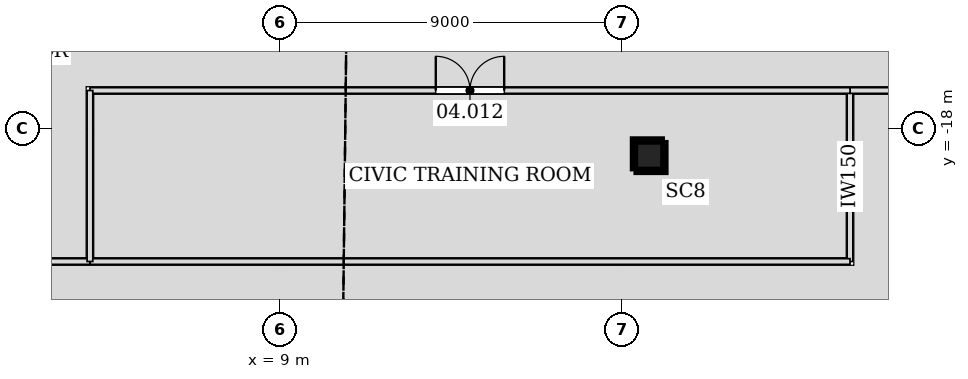
"""IFC4 building model, lengths in metres.
Left out: names, types, materials, properties, quantities, classifications, styles, units other than length and angle.
Written with IfcOpenShell. Run it as: python <this file> out.ifc"""

import sys

from ifc_helpers import new_model, si_unit, direction, frame, frame_2d, origin, origin_2d, place, context, subcontext, project, spatial, rectangle, hollow_rectangle, extrude, element, fill, save


model = new_model("IFC4")
c1 = context("Model", 3, precision=1e-05, world=origin(), true_north=direction((0.0, 1.0)))
c2 = subcontext(c1, "Body", "Model", "MODEL_VIEW")
j1 = project(units=[si_unit("LENGTHUNIT", "METRE"), si_unit("PLANEANGLEUNIT", "RADIAN")], contexts=[c1])
p1 = place(None, origin())
s1 = spatial("IfcSite", under=j1, at=p1, CompositionType="ELEMENT")
p2 = place(p1, origin())
s2 = spatial("IfcBuilding", under=s1, at=p2, CompositionType="ELEMENT")
p3 = place(p2, frame((0.0, 0.0, 24.0)))
s3 = spatial("IfcBuildingStorey", under=s2, at=p3, CompositionType="ELEMENT", Elevation=24.0)
p4 = place(p3, frame((18.764, -18.764, 0.0), z_axis=(-0.019980828539, 0.019980828539, 0.999600686765), x_axis=(-0.707106781187, -0.707106781187, 0.0)))
e1 = element("IfcColumn", 1, at=p4, inside=s3, PredefinedType="COLUMN", context=c2, shape_type="SweptSolid", body=[
    extrude(hollow_rectangle(XDim=0.8, YDim=0.8, WallThickness=0.05, at=origin_2d()), origin(), (0.0, 0.0, 1.0), 4.802),
])
p5 = place(p3, frame((14.788, -35.876, 0.0), z_axis=(0.0, 0.0, 1.0), x_axis=(0.707106781187, 0.707106781187, 0.0)))
e2 = element("IfcWall", 2, at=p5, inside=s3, PredefinedType="SOLIDWALL", context=c2, shape_type="SweptSolid", body=[
    extrude(rectangle(XDim=29.823, YDim=0.35, at=frame_2d((14.912, 0.0))), origin(), (0.0, 0.0, 1.0), 4.5),
])
p6 = place(p5, frame((0.822, 0.0, 0.9)))
e3 = element("IfcOpeningElement", 3, at=p6, cuts=e2, PredefinedType="OPENING", context=c2, shape_type="SweptSolid", body=[
    extrude(rectangle(XDim=1.2, YDim=3.0, at=frame_2d((0.6, 1.5))), frame((0.0, 0.185, 0.0), z_axis=(0.0, -1.0, 0.0), x_axis=(1.0, 0.0, 0.0)), (0.0, 0.0, 1.0), 0.37),
])
p7 = place(p5, frame((3.52, 0.0, 0.9)))
e4 = element("IfcOpeningElement", 4, at=p7, cuts=e2, PredefinedType="OPENING", context=c2, shape_type="SweptSolid", body=[
    extrude(rectangle(XDim=1.2, YDim=3.0, at=frame_2d((0.6, 1.5))), frame((0.0, 0.185, 0.0), z_axis=(0.0, -1.0, 0.0), x_axis=(1.0, 0.0, 0.0)), (0.0, 0.0, 1.0), 0.37),
])
p8 = place(p5, frame((6.218, 0.0, 0.9)))
e5 = element("IfcOpeningElement", 5, at=p8, cuts=e2, PredefinedType="OPENING", context=c2, shape_type="SweptSolid", body=[
    extrude(rectangle(XDim=1.2, YDim=3.0, at=frame_2d((0.6, 1.5))), frame((0.0, 0.185, 0.0), z_axis=(0.0, -1.0, 0.0), x_axis=(1.0, 0.0, 0.0)), (0.0, 0.0, 1.0), 0.37),
])
p9 = place(p5, frame((8.916, 0.0, 0.9)))
e6 = element("IfcOpeningElement", 6, at=p9, cuts=e2, PredefinedType="OPENING", context=c2, shape_type="SweptSolid", body=[
    extrude(rectangle(XDim=1.2, YDim=3.0, at=frame_2d((0.6, 1.5))), frame((0.0, 0.185, 0.0), z_axis=(0.0, -1.0, 0.0), x_axis=(1.0, 0.0, 0.0)), (0.0, 0.0, 1.0), 0.37),
])
p10 = place(p5, frame((11.614, 0.0, 0.9)))
e7 = element("IfcOpeningElement", 7, at=p10, cuts=e2, PredefinedType="OPENING", context=c2, shape_type="SweptSolid", body=[
    extrude(rectangle(XDim=1.2, YDim=3.0, at=frame_2d((0.6, 1.5))), frame((0.0, 0.185, 0.0), z_axis=(0.0, -1.0, 0.0), x_axis=(1.0, 0.0, 0.0)), (0.0, 0.0, 1.0), 0.37),
])
p11 = place(p5, frame((14.312, 0.0, 0.9)))
e8 = element("IfcOpeningElement", 8, at=p11, cuts=e2, PredefinedType="OPENING", context=c2, shape_type="SweptSolid", body=[
    extrude(rectangle(XDim=1.2, YDim=3.0, at=frame_2d((0.6, 1.5))), frame((0.0, 0.185, 0.0), z_axis=(0.0, -1.0, 0.0), x_axis=(1.0, 0.0, 0.0)), (0.0, 0.0, 1.0), 0.37),
])
p12 = place(p5, frame((17.01, 0.0, 0.9)))
e9 = element("IfcOpeningElement", 9, at=p12, cuts=e2, PredefinedType="OPENING", context=c2, shape_type="SweptSolid", body=[
    extrude(rectangle(XDim=1.2, YDim=3.0, at=frame_2d((0.6, 1.5))), frame((0.0, 0.185, 0.0), z_axis=(0.0, -1.0, 0.0), x_axis=(1.0, 0.0, 0.0)), (0.0, 0.0, 1.0), 0.37),
])
p13 = place(p5, frame((19.708, 0.0, 0.9)))
e10 = element("IfcOpeningElement", 10, at=p13, cuts=e2, PredefinedType="OPENING", context=c2, shape_type="SweptSolid", body=[
    extrude(rectangle(XDim=1.2, YDim=3.0, at=frame_2d((0.6, 1.5))), frame((0.0, 0.185, 0.0), z_axis=(0.0, -1.0, 0.0), x_axis=(1.0, 0.0, 0.0)), (0.0, 0.0, 1.0), 0.37),
])
p14 = place(p5, frame((22.406, 0.0, 0.9)))
e11 = element("IfcOpeningElement", 11, at=p14, cuts=e2, PredefinedType="OPENING", context=c2, shape_type="SweptSolid", body=[
    extrude(rectangle(XDim=1.2, YDim=3.0, at=frame_2d((0.6, 1.5))), frame((0.0, 0.185, 0.0), z_axis=(0.0, -1.0, 0.0), x_axis=(1.0, 0.0, 0.0)), (0.0, 0.0, 1.0), 0.37),
])
p15 = place(p5, frame((25.104, 0.0, 0.9)))
e12 = element("IfcOpeningElement", 12, at=p15, cuts=e2, PredefinedType="OPENING", context=c2, shape_type="SweptSolid", body=[
    extrude(rectangle(XDim=1.2, YDim=3.0, at=frame_2d((0.6, 1.5))), frame((0.0, 0.185, 0.0), z_axis=(0.0, -1.0, 0.0), x_axis=(1.0, 0.0, 0.0)), (0.0, 0.0, 1.0), 0.37),
])
p16 = place(p5, frame((27.802, 0.0, 0.9)))
e13 = element("IfcOpeningElement", 13, at=p16, cuts=e2, PredefinedType="OPENING", context=c2, shape_type="SweptSolid", body=[
    extrude(rectangle(XDim=1.2, YDim=3.0, at=frame_2d((0.6, 1.5))), frame((0.0, 0.185, 0.0), z_axis=(0.0, -1.0, 0.0), x_axis=(1.0, 0.0, 0.0)), (0.0, 0.0, 1.0), 0.37),
])
p17 = place(p3, frame((24.0, -17.0, 0.0), z_axis=(0.0, 0.0, 1.0), x_axis=(0.0, -1.0, 0.0)))
e14 = element("IfcWall", 14, at=p17, inside=s3, PredefinedType="PARTITIONING", context=c2, shape_type="SweptSolid", body=[
    extrude(rectangle(XDim=4.5, YDim=0.15, at=frame_2d((2.25, 0.0))), origin(), (0.0, 0.0, 1.0), 3.962),
])
p18 = place(p3, frame((24.0, -21.5, 0.0), z_axis=(0.0, 0.0, 1.0), x_axis=(-1.0, 0.0, 0.0)))
e15 = element("IfcWall", 15, at=p18, inside=s3, PredefinedType="PARTITIONING", context=c2, shape_type="SweptSolid", body=[
    extrude(rectangle(XDim=20.001, YDim=0.15, at=frame_2d((10.0, 0.0))), origin(), (0.0, 0.0, 1.0), 3.19),
])
p19 = place(p3, frame((4.001, -21.5, 0.0), z_axis=(0.0, 0.0, 1.0), x_axis=(-1.0, 0.0, 0.0)))
e16 = element("IfcWall", 16, at=p19, inside=s3, PredefinedType="PARTITIONING", context=c2, shape_type="SweptSolid", body=[
    extrude(rectangle(XDim=5.351, YDim=0.15, at=frame_2d((2.676, 0.0))), origin(), (0.0, 0.0, 1.0), 3.19),
])
p20 = place(p3, frame((33.417, -17.0, 0.0), z_axis=(0.0, 0.0, 1.0), x_axis=(-1.0, 0.0, 0.0)))
e17 = element("IfcWall", 17, at=p20, inside=s3, PredefinedType="PARTITIONING", context=c2, shape_type="SweptSolid", body=[
    extrude(rectangle(XDim=9.417, YDim=0.15, at=frame_2d((4.708, 0.0))), origin(), (0.0, 0.0, 1.0), 3.479),
])
p21 = place(p20, frame((3.808, 0.0, 0.0)))
e18 = element("IfcOpeningElement", 18, at=p21, cuts=e17, PredefinedType="OPENING", context=c2, shape_type="SweptSolid", body=[
    extrude(rectangle(XDim=1.8, YDim=2.4, at=frame_2d((0.9, 1.2))), frame((0.0, 0.085, 0.0), z_axis=(0.0, -1.0, 0.0), x_axis=(1.0, 0.0, 0.0)), (0.0, 0.0, 1.0), 0.17),
])
p22 = place(p3, frame((24.0, -17.0, 0.0), z_axis=(0.0, 0.0, 1.0), x_axis=(-1.0, 0.0, 0.0)))
e19 = element("IfcWall", 19, at=p22, inside=s3, PredefinedType="PARTITIONING", context=c2, shape_type="SweptSolid", body=[
    extrude(rectangle(XDim=20.0, YDim=0.15, at=frame_2d((10.0, 0.0))), origin(), (0.0, 0.0, 1.0), 3.19),
])
p23 = place(p22, frame((9.1, 0.0, 0.0)))
e20 = element("IfcOpeningElement", 20, at=p23, cuts=e19, PredefinedType="OPENING", context=c2, shape_type="SweptSolid", body=[
    extrude(rectangle(XDim=1.8, YDim=2.4, at=frame_2d((0.9, 1.2))), frame((0.0, 0.085, 0.0), z_axis=(0.0, -1.0, 0.0), x_axis=(1.0, 0.0, 0.0)), (0.0, 0.0, 1.0), 0.17),
])
p24 = place(p3, frame((4.0, -17.0, 0.0), z_axis=(0.0, 0.0, 1.0), x_axis=(0.0, -1.0, 0.0)))
e21 = element("IfcWall", 21, at=p24, inside=s3, PredefinedType="PARTITIONING", context=c2, shape_type="SweptSolid", body=[
    extrude(rectangle(XDim=4.5, YDim=0.15, at=frame_2d((2.25, 0.0))), origin(), (0.0, 0.0, 1.0), 3.644),
])
p25 = place(p23, frame((1.8, 0.0, 0.0), z_axis=(0.0, 0.0, 1.0), x_axis=(-1.0, 0.0, 0.0)))
e22 = element("IfcDoor", 22, at=p25, inside=s3, OperationType="DOUBLE_DOOR_SINGLE_SWING", PredefinedType="DOOR", context=c2, shape_type="SweptSolid", body=[
    extrude(rectangle(XDim=1.8, YDim=2.4, at=frame_2d((0.9, 1.2))), frame((0.0, 0.025, 0.0), z_axis=(0.0, -1.0, 0.0), x_axis=(1.0, 0.0, 0.0)), (0.0, 0.0, 1.0), 0.05),
])
fill(e20, e22)
save(model, sys.argv[1])
